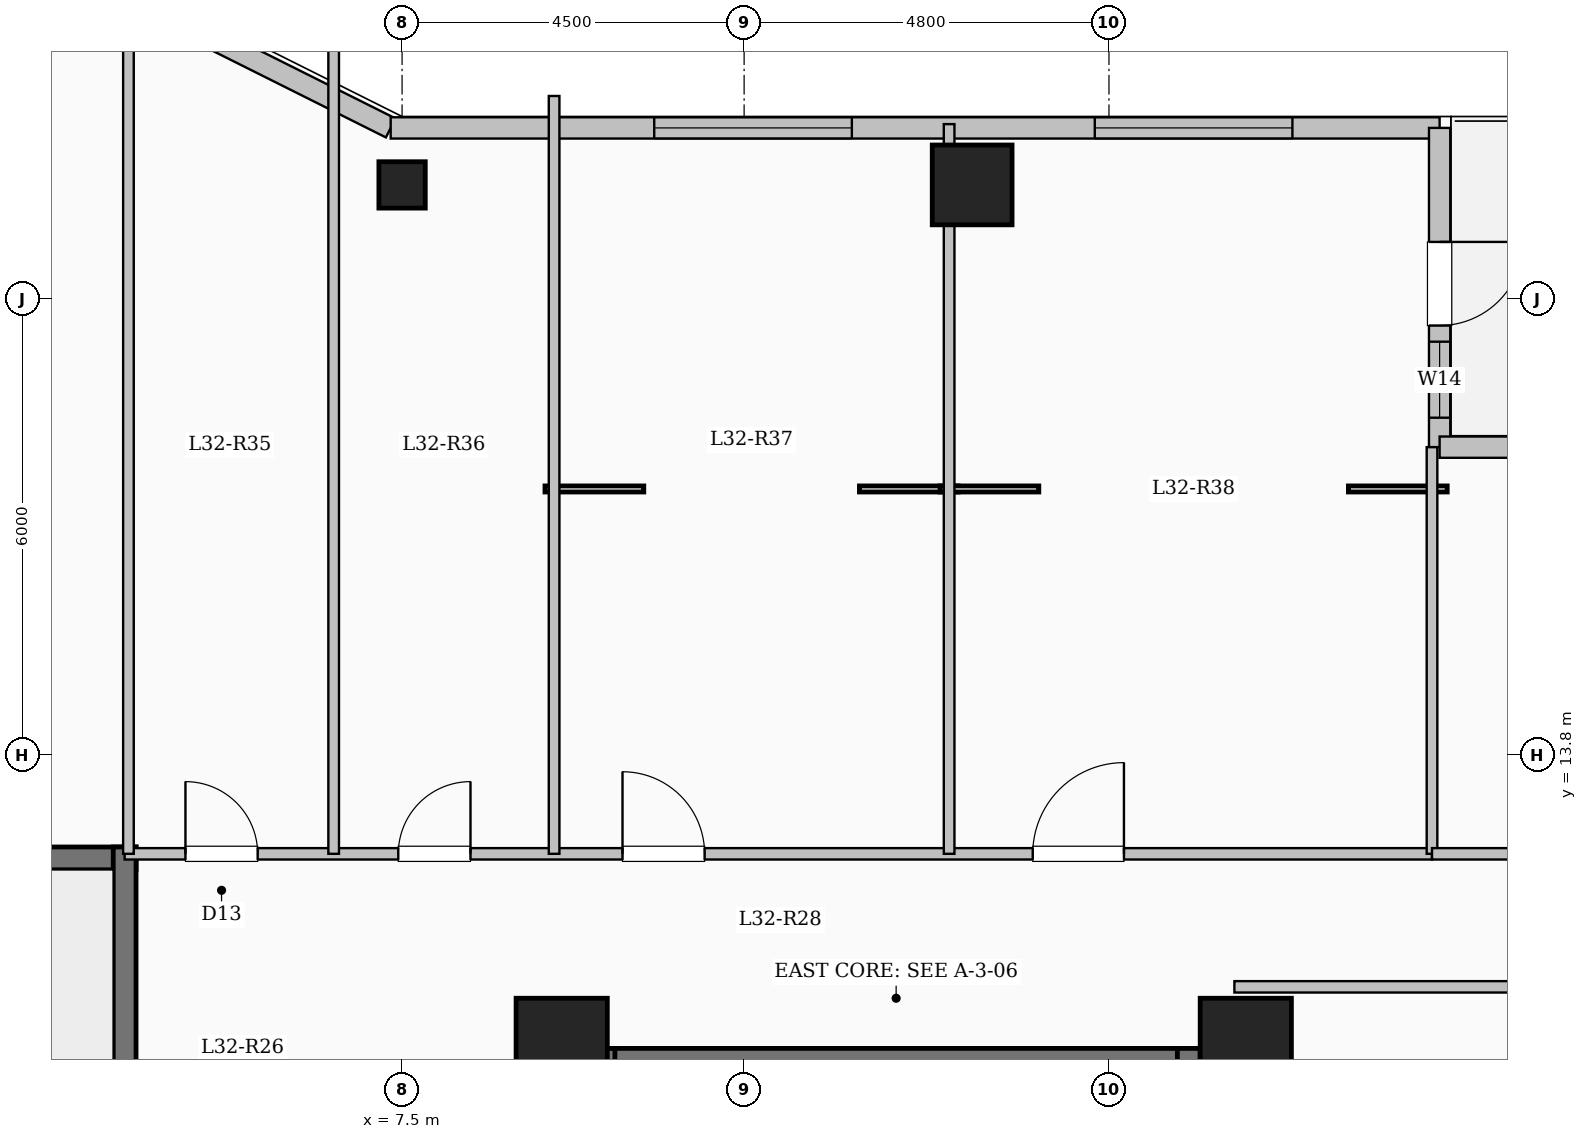
"""IFC4 building model, lengths in metres.
Left out: names, types, materials, properties, quantities, classifications, styles, units other than length and angle.
Written with IfcOpenShell. Run it as: python <this file> out.ifc"""

import sys

from ifc_helpers import new_model, si_unit, direction, frame, frame_2d, origin, origin_2d, place, context, subcontext, project, spatial, rectangle, hollow_circle, extrude, element, fill, save


model = new_model("IFC4")
c1 = context("Model", 3, precision=1e-05, world=origin(), true_north=direction((0.0, 1.0)))
c2 = subcontext(c1, "Body", "Model", "MODEL_VIEW")
j1 = project(units=[si_unit("LENGTHUNIT", "METRE"), si_unit("PLANEANGLEUNIT", "RADIAN")], contexts=[c1])
p1 = place(None, origin())
s1 = spatial("IfcSite", under=j1, at=p1, CompositionType="ELEMENT")
p2 = place(p1, origin())
s2 = spatial("IfcBuilding", under=s1, at=p2, CompositionType="ELEMENT")
p3 = place(p2, frame((0.0, 0.0, 118.5)))
s3 = spatial("IfcBuildingStorey", under=s2, at=p3, CompositionType="ELEMENT", Elevation=118.5)
for number, where, z_axis, x_axis in (
    (1, (9.6, 10.0, 0.0), (0.0, 0.0, 1.0), (1.0, 0.0, 0.0)),
    (2, (18.6, 10.0, 0.0), (0.0, 0.0, 1.0), (1.0, 0.0, 0.0)),
):
    element("IfcColumn", number, at=place(p3, frame(where, z_axis=z_axis, x_axis=x_axis)), inside=s3, PredefinedType="COLUMN", context=c2, shape_type="SweptSolid", body=[
        extrude(rectangle(XDim=1.2, YDim=1.2, at=origin_2d()), origin(), (0.0, 0.0, 1.0), 4.5),
    ])
p4 = place(p3, frame((7.5, 21.3, 0.0), z_axis=(0.0, 0.0, 1.0), x_axis=(1.0, 0.0, 0.0)))
e3 = element("IfcColumn", 3, at=p4, inside=s3, PredefinedType="COLUMN", context=c2, shape_type="SweptSolid", body=[
    extrude(hollow_circle(Radius=0.305, WallThickness=0.025, at=origin_2d()), origin(), (0.0, 0.0, 1.0), 4.5),
])
p5 = place(p3, frame((15.0, 21.3, 0.0), z_axis=(0.0, 0.0, 1.0), x_axis=(1.0, 0.0, 0.0)))
e4 = element("IfcColumn", 4, at=p5, inside=s3, PredefinedType="COLUMN", context=c2, shape_type="SweptSolid", body=[
    extrude(rectangle(XDim=1.05, YDim=1.05, at=origin_2d()), origin(), (0.0, 0.0, 1.0), 4.5),
])
p6 = place(p3, frame((4.35, 23.55, 0.0), z_axis=(0.0, 0.0, 1.0), x_axis=(0.894427191, -0.4472135955, 0.0)))
e5 = element("IfcWall", 5, at=p6, inside=s3, PredefinedType="SOLIDWALL", context=c2, shape_type="SweptSolid", body=[
    extrude(rectangle(XDim=3.354, YDim=0.28, at=frame_2d((1.677, 0.0))), origin(), (0.0, 0.0, 1.0), 4.2),
])
p7 = place(p3, frame((7.35, 22.05, 0.0), z_axis=(0.0, 0.0, 1.0), x_axis=(1.0, 0.0, 0.0)))
e6 = element("IfcWall", 6, at=p7, inside=s3, PredefinedType="SOLIDWALL", context=c2, shape_type="SweptSolid", body=[
    extrude(rectangle(XDim=13.8, YDim=0.28, at=frame_2d((6.9, 0.0))), origin(), (0.0, 0.0, 1.0), 4.2),
])
p8 = place(p7, frame((3.467, 0.0, 0.85)))
e7 = element("IfcOpeningElement", 7, at=p8, cuts=e6, PredefinedType="OPENING", context=c2, shape_type="SweptSolid", body=[
    extrude(rectangle(XDim=2.6, YDim=2.4, at=frame_2d((1.3, 1.2))), frame((0.0, 0.15, 0.0), z_axis=(0.0, -1.0, 0.0), x_axis=(1.0, 0.0, 0.0)), (0.0, 0.0, 1.0), 0.3),
])
p9 = place(p7, frame((9.263, 0.0, 0.85)))
e8 = element("IfcOpeningElement", 8, at=p9, cuts=e6, PredefinedType="OPENING", context=c2, shape_type="SweptSolid", body=[
    extrude(rectangle(XDim=2.6, YDim=2.4, at=frame_2d((1.3, 1.2))), frame((0.0, 0.15, 0.0), z_axis=(0.0, -1.0, 0.0), x_axis=(1.0, 0.0, 0.0)), (0.0, 0.0, 1.0), 0.3),
])
p10 = place(p3, frame((21.15, 22.05, 0.0), z_axis=(0.0, 0.0, 1.0), x_axis=(0.0, -1.0, 0.0)))
e9 = element("IfcWall", 9, at=p10, inside=s3, PredefinedType="SOLIDWALL", context=c2, shape_type="SweptSolid", body=[
    extrude(rectangle(XDim=4.2, YDim=0.28, at=frame_2d((2.1, 0.0))), origin(), (0.0, 0.0, 1.0), 4.2),
])
p11 = place(p10, frame((1.5, 0.0, 0.0)))
e10 = element("IfcOpeningElement", 10, at=p11, cuts=e9, PredefinedType="OPENING", context=c2, shape_type="SweptSolid", body=[
    extrude(rectangle(XDim=1.1, YDim=2.2, at=frame_2d((0.55, 1.1))), frame((0.0, 0.15, 0.0), z_axis=(0.0, -1.0, 0.0), x_axis=(1.0, 0.0, 0.0)), (0.0, 0.0, 1.0), 0.3),
])
p12 = place(p10, frame((2.812, 0.0, 0.95)))
e11 = element("IfcOpeningElement", 11, at=p12, cuts=e9, PredefinedType="OPENING", context=c2, shape_type="SweptSolid", body=[
    extrude(rectangle(XDim=1.0, YDim=1.5, at=frame_2d((0.5, 0.75))), frame((0.0, 0.15, 0.0), z_axis=(0.0, -1.0, 0.0), x_axis=(1.0, 0.0, 0.0)), (0.0, 0.0, 1.0), 0.3),
])
p13 = place(p3, frame((21.15, 17.85, 0.0), z_axis=(0.0, 0.0, 1.0), x_axis=(1.0, 0.0, 0.0)))
e12 = element("IfcWall", 12, at=p13, inside=s3, PredefinedType="SOLIDWALL", context=c2, shape_type="SweptSolid", body=[
    extrude(rectangle(XDim=5.7, YDim=0.28, at=frame_2d((2.85, 0.0))), origin(), (0.0, 0.0, 1.0), 4.2),
])
p14 = place(p13, frame((1.525, 0.0, 0.85)))
e13 = element("IfcOpeningElement", 13, at=p14, cuts=e12, PredefinedType="OPENING", context=c2, shape_type="SweptSolid", body=[
    extrude(rectangle(XDim=2.6, YDim=2.4, at=frame_2d((1.3, 1.2))), frame((0.0, 0.15, 0.0), z_axis=(0.0, -1.0, 0.0), x_axis=(1.0, 0.0, 0.0)), (0.0, 0.0, 1.0), 0.3),
])
p15 = place(p3, frame((10.0, 9.79, 0.0), z_axis=(0.0, 0.0, 1.0), x_axis=(1.0, 0.0, 0.0)))
e14 = element("IfcWall", 14, at=p15, inside=s3, PredefinedType="SHEAR", context=c2, shape_type="SweptSolid", body=[
    extrude(rectangle(XDim=8.0, YDim=0.3, at=frame_2d((4.0, 0.0))), origin(), (0.0, 0.0, 1.0), 4.5),
])
for number, where, z_axis, x_axis in (
    (15, (10.15, 6.35, 0.0), (0.0, 0.0, 1.0), (0.0, 1.0, 0.0)),
    (16, (17.85, 6.35, 0.0), (0.0, 0.0, 1.0), (0.0, 1.0, 0.0)),
):
    element("IfcWall", number, at=place(p3, frame(where, z_axis=z_axis, x_axis=x_axis)), inside=s3, PredefinedType="SHEAR", context=c2, shape_type="SweptSolid", body=[
        extrude(rectangle(XDim=3.59, YDim=0.3, at=frame_2d((1.795, 0.0))), origin(), (0.0, 0.0, 1.0), 4.5),
    ])
p16 = place(p3, frame((-4.0, 12.44, 0.0), z_axis=(0.0, 0.0, 1.0), x_axis=(1.0, 0.0, 0.0)))
e17 = element("IfcWall", 17, at=p16, inside=s3, PredefinedType="SHEAR", context=c2, shape_type="SweptSolid", body=[
    extrude(rectangle(XDim=8.0, YDim=0.3, at=frame_2d((4.0, 0.0))), origin(), (0.0, 0.0, 1.0), 4.5),
])
p17 = place(p3, frame((3.85, 9.0, 0.0), z_axis=(0.0, 0.0, 1.0), x_axis=(0.0, 1.0, 0.0)))
e18 = element("IfcWall", 18, at=p17, inside=s3, PredefinedType="SHEAR", context=c2, shape_type="SweptSolid", body=[
    extrude(rectangle(XDim=3.59, YDim=0.3, at=frame_2d((1.795, 0.0))), origin(), (0.0, 0.0, 1.0), 4.5),
])
p18 = place(p3, frame((3.85, 12.5, 0.0), z_axis=(0.0, 0.0, 1.0), x_axis=(1.0, 0.0, 0.0)))
e19 = element("IfcWall", 19, at=p18, inside=s3, PredefinedType="PARTITIONING", context=c2, shape_type="SweptSolid", body=[
    extrude(rectangle(XDim=17.2, YDim=0.15, at=frame_2d((8.6, 0.0))), origin(), (0.0, 0.0, 1.0), 4.2),
])
p19 = place(p18, frame((0.8, 0.0, 0.0)))
e20 = element("IfcOpeningElement", 20, at=p19, cuts=e19, PredefinedType="OPENING", context=c2, shape_type="SweptSolid", body=[
    extrude(rectangle(XDim=0.95, YDim=2.15, at=frame_2d((0.475, 1.075))), frame((0.0, 0.085, 0.0), z_axis=(0.0, -1.0, 0.0), x_axis=(1.0, 0.0, 0.0)), (0.0, 0.0, 1.0), 0.17),
])
p20 = place(p18, frame((3.6, 0.0, 0.0)))
e21 = element("IfcOpeningElement", 21, at=p20, cuts=e19, PredefinedType="OPENING", context=c2, shape_type="SweptSolid", body=[
    extrude(rectangle(XDim=0.95, YDim=2.15, at=frame_2d((0.475, 1.075))), frame((0.0, 0.085, 0.0), z_axis=(0.0, -1.0, 0.0), x_axis=(1.0, 0.0, 0.0)), (0.0, 0.0, 1.0), 0.17),
])
p21 = place(p18, frame((6.55, 0.0, 0.0)))
e22 = element("IfcOpeningElement", 22, at=p21, cuts=e19, PredefinedType="OPENING", context=c2, shape_type="SweptSolid", body=[
    extrude(rectangle(XDim=1.08, YDim=2.15, at=frame_2d((0.54, 1.075))), frame((0.0, 0.085, 0.0), z_axis=(0.0, -1.0, 0.0), x_axis=(1.0, 0.0, 0.0)), (0.0, 0.0, 1.0), 0.17),
])
p22 = place(p18, frame((11.947, 0.0, 0.0)))
e23 = element("IfcOpeningElement", 23, at=p22, cuts=e19, PredefinedType="OPENING", context=c2, shape_type="SweptSolid", body=[
    extrude(rectangle(XDim=1.2, YDim=2.15, at=frame_2d((0.6, 1.075))), frame((0.0, 0.085, 0.0), z_axis=(0.0, -1.0, 0.0), x_axis=(1.0, 0.0, 0.0)), (0.0, 0.0, 1.0), 0.17),
])
p23 = place(p3, frame((3.9, 12.5, 0.0), z_axis=(0.0, 0.0, 1.0), x_axis=(0.0, 1.0, 0.0)))
e24 = element("IfcWall", 24, at=p23, inside=s3, PredefinedType="PARTITIONING", context=c2, shape_type="SweptSolid", body=[
    extrude(rectangle(XDim=11.08, YDim=0.14, at=frame_2d((5.54, 0.0))), origin(), (0.0, 0.0, 1.0), 4.2),
])
p24 = place(p3, frame((6.6, 12.5, 0.0), z_axis=(0.0, 0.0, 1.0), x_axis=(0.0, 1.0, 0.0)))
e25 = element("IfcWall", 25, at=p24, inside=s3, PredefinedType="PARTITIONING", context=c2, shape_type="SweptSolid", body=[
    extrude(rectangle(XDim=10.685, YDim=0.14, at=frame_2d((5.343, 0.0))), origin(), (0.0, 0.0, 1.0), 4.2),
])
p25 = place(p3, frame((9.5, 12.5, 0.0), z_axis=(0.0, 0.0, 1.0), x_axis=(0.0, 1.0, 0.0)))
e26 = element("IfcWall", 26, at=p25, inside=s3, PredefinedType="PARTITIONING", context=c2, shape_type="SweptSolid", body=[
    extrude(rectangle(XDim=9.97, YDim=0.14, at=frame_2d((4.985, 0.0))), origin(), (0.0, 0.0, 1.0), 4.2),
])
p26 = place(p3, frame((14.697, 12.5, 0.0), z_axis=(0.0, 0.0, 1.0), x_axis=(0.0, 1.0, 0.0)))
e27 = element("IfcWall", 27, at=p26, inside=s3, PredefinedType="PARTITIONING", context=c2, shape_type="SweptSolid", body=[
    extrude(rectangle(XDim=9.6, YDim=0.14, at=frame_2d((4.8, 0.0))), origin(), (0.0, 0.0, 1.0), 3.535),
])
p27 = place(p3, frame((18.45, 10.75, 0.0), z_axis=(0.0, 0.0, 1.0), x_axis=(1.0, 0.0, 0.0)))
e28 = element("IfcWall", 28, at=p27, inside=s3, PredefinedType="PARTITIONING", context=c2, shape_type="SweptSolid", body=[
    extrude(rectangle(XDim=8.43, YDim=0.15, at=frame_2d((4.215, 0.0))), origin(), (0.0, 0.0, 1.0), 4.2),
])
p28 = place(p3, frame((21.05, 12.5, 0.0), z_axis=(0.0, 0.0, 1.0), x_axis=(0.0, 1.0, 0.0)))
e29 = element("IfcWall", 29, at=p28, inside=s3, PredefinedType="PARTITIONING", context=c2, shape_type="SweptSolid", body=[
    extrude(rectangle(XDim=5.35, YDim=0.14, at=frame_2d((2.675, 0.0))), origin(), (0.0, 0.0, 1.0), 4.2),
])
p29 = place(p3, frame((21.05, 12.5, 0.0), z_axis=(0.0, 0.0, 1.0), x_axis=(1.0, 0.0, 0.0)))
e30 = element("IfcWall", 30, at=p29, inside=s3, PredefinedType="PARTITIONING", context=c2, shape_type="SweptSolid", body=[
    extrude(rectangle(XDim=5.83, YDim=0.15, at=frame_2d((2.915, 0.0))), origin(), (0.0, 0.0, 1.0), 4.2),
])
p30 = place(p29, frame((2.44, 0.0, 0.0)))
e31 = element("IfcOpeningElement", 31, at=p30, cuts=e30, PredefinedType="OPENING", context=c2, shape_type="SweptSolid", body=[
    extrude(rectangle(XDim=0.95, YDim=2.15, at=frame_2d((0.475, 1.075))), frame((0.0, 0.085, 0.0), z_axis=(0.0, -1.0, 0.0), x_axis=(1.0, 0.0, 0.0)), (0.0, 0.0, 1.0), 0.17),
])
p31 = place(p8, origin())
e32 = element("IfcWindow", 32, at=p31, inside=s3, PartitioningType="SINGLE_PANEL", PredefinedType="WINDOW", context=c2, shape_type="SweptSolid", body=[
    extrude(rectangle(XDim=2.6, YDim=2.4, at=frame_2d((1.3, 1.2))), frame((0.0, 0.03, 0.0), z_axis=(0.0, -1.0, 0.0), x_axis=(1.0, 0.0, 0.0)), (0.0, 0.0, 1.0), 0.06),
])
fill(e7, e32)
p32 = place(p9, origin())
e33 = element("IfcWindow", 33, at=p32, inside=s3, PartitioningType="SINGLE_PANEL", PredefinedType="WINDOW", context=c2, shape_type="SweptSolid", body=[
    extrude(rectangle(XDim=2.6, YDim=2.4, at=frame_2d((1.3, 1.2))), frame((0.0, 0.03, 0.0), z_axis=(0.0, -1.0, 0.0), x_axis=(1.0, 0.0, 0.0)), (0.0, 0.0, 1.0), 0.06),
])
fill(e8, e33)
p33 = place(p11, origin())
e34 = element("IfcDoor", 34, at=p33, inside=s3, OperationType="SINGLE_SWING_LEFT", PredefinedType="DOOR", context=c2, shape_type="SweptSolid", body=[
    extrude(rectangle(XDim=1.1, YDim=2.2, at=frame_2d((0.55, 1.1))), frame((0.0, 0.025, 0.0), z_axis=(0.0, -1.0, 0.0), x_axis=(1.0, 0.0, 0.0)), (0.0, 0.0, 1.0), 0.05),
])
fill(e10, e34)
p34 = place(p12, origin())
e35 = element("IfcWindow", 35, at=p34, inside=s3, PartitioningType="SINGLE_PANEL", PredefinedType="WINDOW", context=c2, shape_type="SweptSolid", body=[
    extrude(rectangle(XDim=1.0, YDim=1.5, at=frame_2d((0.5, 0.75))), frame((0.0, 0.03, 0.0), z_axis=(0.0, -1.0, 0.0), x_axis=(1.0, 0.0, 0.0)), (0.0, 0.0, 1.0), 0.06),
])
fill(e11, e35)
p35 = place(p19, origin())
e36 = element("IfcDoor", 36, at=p35, inside=s3, OperationType="SINGLE_SWING_LEFT", PredefinedType="DOOR", context=c2, shape_type="SweptSolid", body=[
    extrude(rectangle(XDim=0.95, YDim=2.15, at=frame_2d((0.475, 1.075))), frame((0.0, 0.025, 0.0), z_axis=(0.0, -1.0, 0.0), x_axis=(1.0, 0.0, 0.0)), (0.0, 0.0, 1.0), 0.05),
])
fill(e20, e36)
p36 = place(p20, origin())
e37 = element("IfcDoor", 37, at=p36, inside=s3, OperationType="SINGLE_SWING_RIGHT", PredefinedType="DOOR", context=c2, shape_type="SweptSolid", body=[
    extrude(rectangle(XDim=0.95, YDim=2.15, at=frame_2d((0.475, 1.075))), frame((0.0, 0.025, 0.0), z_axis=(0.0, -1.0, 0.0), x_axis=(1.0, 0.0, 0.0)), (0.0, 0.0, 1.0), 0.05),
])
fill(e21, e37)
p37 = place(p21, origin())
e38 = element("IfcDoor", 38, at=p37, inside=s3, OperationType="SINGLE_SWING_LEFT", PredefinedType="DOOR", context=c2, shape_type="SweptSolid", body=[
    extrude(rectangle(XDim=1.08, YDim=2.15, at=frame_2d((0.54, 1.075))), frame((0.0, 0.025, 0.0), z_axis=(0.0, -1.0, 0.0), x_axis=(1.0, 0.0, 0.0)), (0.0, 0.0, 1.0), 0.05),
])
fill(e22, e38)
p38 = place(p22, origin())
e39 = element("IfcDoor", 39, at=p38, inside=s3, OperationType="SINGLE_SWING_RIGHT", PredefinedType="DOOR", context=c2, shape_type="SweptSolid", body=[
    extrude(rectangle(XDim=1.2, YDim=2.15, at=frame_2d((0.6, 1.075))), frame((0.0, 0.025, 0.0), z_axis=(0.0, -1.0, 0.0), x_axis=(1.0, 0.0, 0.0)), (0.0, 0.0, 1.0), 0.05),
])
fill(e23, e39)
save(model, sys.argv[1])
